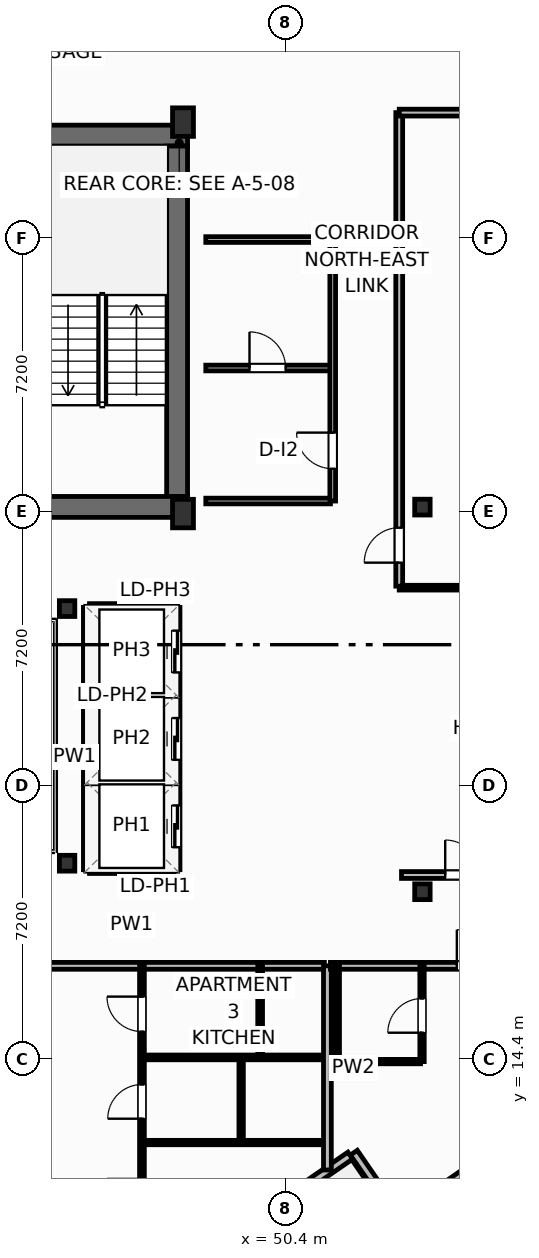
"""IFC4 building model, lengths in metres.
Left out: names, types, materials, properties, quantities, classifications, styles, units other than length and angle.
Written with IfcOpenShell. Run it as: python <this file> out.ifc"""

import sys

from ifc_helpers import new_model, si_unit, direction, frame, frame_2d, origin, origin_2d, place, context, subcontext, project, spatial, rectangle, i_section, extrude, element, fill, save


model = new_model("IFC4")
c1 = context("Model", 3, precision=1e-05, world=origin(), true_north=direction((0.0, 1.0)))
c2 = subcontext(c1, "Body", "Model", "MODEL_VIEW")
j1 = project(units=[si_unit("LENGTHUNIT", "METRE"), si_unit("PLANEANGLEUNIT", "RADIAN")], contexts=[c1])
p1 = place(None, origin())
s1 = spatial("IfcSite", under=j1, at=p1, CompositionType="ELEMENT")
p2 = place(p1, origin())
s2 = spatial("IfcBuilding", under=s1, at=p2, CompositionType="ELEMENT")
p3 = place(p2, frame((0.0, 0.0, 269.3)))
s3 = spatial("IfcBuildingStorey", under=s2, at=p3, CompositionType="ELEMENT", Elevation=269.3)
for number, where, z_axis, x_axis in (
    (1, (47.7, 28.75, 0.0), (0.0, 0.0, 1.0), (1.0, 0.0, 0.0)),
    (2, (47.7, 39.05, 0.0), (0.0, 0.0, 1.0), (1.0, 0.0, 0.0)),
):
    element("IfcColumn", number, at=place(p3, frame(where, z_axis=z_axis, x_axis=x_axis)), inside=s3, PredefinedType="COLUMN", context=c2, shape_type="SweptSolid", body=[
        extrude(rectangle(XDim=0.55, YDim=0.75, at=origin_2d()), origin(), (0.0, 0.0, 1.0), 3.7),
    ])
for number, where, z_axis, x_axis in (
    (3, (44.65, 19.55, 0.0), (0.0, 0.0, 1.0), (1.0, 0.0, 0.0)),
    (4, (44.65, 26.25, 0.0), (0.0, 0.0, 1.0), (1.0, 0.0, 0.0)),
    (5, (54.0, 18.8, 0.0), (0.0, 0.0, 1.0), (1.0, 0.0, 0.0)),
    (6, (54.0, 28.92, 0.0), (0.0, 0.0, 1.0), (1.0, 0.0, 0.0)),
):
    element("IfcColumn", number, at=place(p3, frame(where, z_axis=z_axis, x_axis=x_axis)), inside=s3, PredefinedType="COLUMN", context=c2, shape_type="SweptSolid", body=[
        extrude(i_section(OverallWidth=0.406, OverallDepth=0.416, WebThickness=0.03, FlangeThickness=0.048, FilletRadius=0.025, at=origin_2d()), origin(), (0.0, 0.0, 1.0), 3.7),
    ])
p4 = place(p3, frame((30.58, 38.695, 0.0), z_axis=(0.0, 0.0, 1.0), x_axis=(1.0, 0.0, 0.0)))
e7 = element("IfcWall", 7, at=p4, inside=s3, PredefinedType="SHEAR", context=c2, shape_type="SweptSolid", body=[
    extrude(rectangle(XDim=17.24, YDim=0.55, at=frame_2d((8.62, 0.0))), origin(), (0.0, 0.0, 1.0), 3.45),
])
p5 = place(p3, frame((47.545, 29.2, 0.0), z_axis=(0.0, 0.0, 1.0), x_axis=(0.0, 1.0, 0.0)))
e8 = element("IfcWall", 8, at=p5, inside=s3, PredefinedType="SHEAR", context=c2, shape_type="SweptSolid", body=[
    extrude(rectangle(XDim=9.22, YDim=0.55, at=frame_2d((4.61, 0.0))), origin(), (0.0, 0.0, 1.0), 3.45),
])
p6 = place(p3, frame((43.6, 28.925, 0.0), z_axis=(0.0, 0.0, 1.0), x_axis=(1.0, 0.0, 0.0)))
e9 = element("IfcWall", 9, at=p6, inside=s3, PredefinedType="SHEAR", context=c2, shape_type="SweptSolid", body=[
    extrude(rectangle(XDim=4.22, YDim=0.55, at=frame_2d((2.11, 0.0))), origin(), (0.0, 0.0, 1.0), 3.45),
])
p7 = place(p3, frame((52.103, 11.857, 0.0), z_axis=(0.0, 0.0, 1.0), x_axis=(-0.823534636215, -0.567265989598, 0.0)))
e10 = element("IfcWall", 10, at=p7, inside=s3, PredefinedType="SOLIDWALL", context=c2, shape_type="SweptSolid", body=[
    extrude(rectangle(XDim=6.0, YDim=0.22, at=frame_2d((3.0, 0.0))), origin(), (0.0, 0.0, 1.0), 2.73),
])
p8 = place(p7, frame((3.5, 0.0, 0.0)))
e11 = element("IfcOpeningElement", 11, at=p8, cuts=e10, PredefinedType="OPENING", context=c2, shape_type="SweptSolid", body=[
    extrude(rectangle(XDim=2.1, YDim=2.3, at=frame_2d((1.05, 1.15))), frame((0.0, 0.12, 0.0), z_axis=(0.0, -1.0, 0.0), x_axis=(1.0, 0.0, 0.0)), (0.0, 0.0, 1.0), 0.24),
])
p9 = place(p3, frame((52.196, 11.933, 0.0), z_axis=(0.0, 0.0, 1.0), x_axis=(0.56729822855, -0.823512428494, 0.0)))
e12 = element("IfcWall", 12, at=p9, inside=s3, PredefinedType="SOLIDWALL", context=c2, shape_type="SweptSolid", body=[
    extrude(rectangle(XDim=2.1, YDim=0.22, at=frame_2d((1.05, 0.0))), origin(), (0.0, 0.0, 1.0), 2.73),
])
p10 = place(p3, frame((53.49, 10.275, 0.0), z_axis=(0.0, 0.0, 1.0), x_axis=(0.823530942962, 0.56727135128, 0.0)))
e13 = element("IfcWall", 13, at=p10, inside=s3, PredefinedType="SOLIDWALL", context=c2, shape_type="SweptSolid", body=[
    extrude(rectangle(XDim=8.035, YDim=0.22, at=frame_2d((4.018, 0.0))), origin(), (0.0, 0.0, 1.0), 2.73),
])
p11 = place(p10, frame((2.968, 0.0, 0.8)))
e14 = element("IfcOpeningElement", 14, at=p11, cuts=e13, PredefinedType="OPENING", context=c2, shape_type="SweptSolid", body=[
    extrude(rectangle(XDim=2.1, YDim=1.75, at=frame_2d((1.05, 0.875))), frame((0.0, 0.12, 0.0), z_axis=(0.0, -1.0, 0.0), x_axis=(1.0, 0.0, 0.0)), (0.0, 0.0, 1.0), 0.24),
])
p12 = place(p3, frame((39.28, 16.85, 0.0), z_axis=(0.0, 0.0, 1.0), x_axis=(1.0, 0.0, 0.0)))
e15 = element("IfcWall", 15, at=p12, inside=s3, PredefinedType="PARTITIONING", context=c2, shape_type="SweptSolid", body=[
    extrude(rectangle(XDim=12.14, YDim=0.18, at=frame_2d((6.07, 0.0))), origin(), (0.0, 0.0, 1.0), 3.45),
])
p13 = place(p12, frame((3.135, 0.0, 0.0)))
e16 = element("IfcOpeningElement", 16, at=p13, cuts=e15, PredefinedType="OPENING", context=c2, shape_type="SweptSolid", body=[
    extrude(rectangle(XDim=1.0, YDim=2.2, at=frame_2d((0.5, 1.1))), frame((0.0, 0.1, 0.0), z_axis=(0.0, -1.0, 0.0), x_axis=(1.0, 0.0, 0.0)), (0.0, 0.0, 1.0), 0.2),
])
p14 = place(p3, frame((46.62, 5.567, 0.0), z_axis=(0.0, 0.0, 1.0), x_axis=(0.0, 1.0, 0.0)))
e17 = element("IfcWall", 17, at=p14, inside=s3, PredefinedType="PARTITIONING", context=c2, shape_type="SweptSolid", body=[
    extrude(rectangle(XDim=11.283, YDim=0.125, at=frame_2d((5.642, 0.0))), origin(), (0.0, 0.0, 1.0), 3.45),
])
p15 = place(p14, frame((4.757, 0.0, 0.0)))
e18 = element("IfcOpeningElement", 18, at=p15, cuts=e17, PredefinedType="OPENING", context=c2, shape_type="SweptSolid", body=[
    extrude(rectangle(XDim=0.92, YDim=2.05, at=frame_2d((0.46, 1.025))), frame((0.0, 0.073, 0.0), z_axis=(0.0, -1.0, 0.0), x_axis=(1.0, 0.0, 0.0)), (0.0, 0.0, 1.0), 0.145),
])
p16 = place(p14, frame((7.26, 0.0, 0.0)))
e19 = element("IfcOpeningElement", 19, at=p16, cuts=e17, PredefinedType="OPENING", context=c2, shape_type="SweptSolid", body=[
    extrude(rectangle(XDim=0.9, YDim=2.05, at=frame_2d((0.45, 1.025))), frame((0.0, 0.073, 0.0), z_axis=(0.0, -1.0, 0.0), x_axis=(1.0, 0.0, 0.0)), (0.0, 0.0, 1.0), 0.145),
])
p17 = place(p14, frame((9.553, 0.0, 0.0)))
e20 = element("IfcOpeningElement", 20, at=p17, cuts=e17, PredefinedType="OPENING", context=c2, shape_type="SweptSolid", body=[
    extrude(rectangle(XDim=0.92, YDim=2.05, at=frame_2d((0.46, 1.025))), frame((0.0, 0.073, 0.0), z_axis=(0.0, -1.0, 0.0), x_axis=(1.0, 0.0, 0.0)), (0.0, 0.0, 1.0), 0.145),
])
p18 = place(p3, frame((46.69, 14.44, 0.0), z_axis=(0.0, 0.0, 1.0), x_axis=(1.0, 0.0, 0.0)))
e21 = element("IfcWall", 21, at=p18, inside=s3, PredefinedType="PARTITIONING", context=c2, shape_type="SweptSolid", body=[
    extrude(rectangle(XDim=4.73, YDim=0.125, at=frame_2d((2.365, 0.0))), origin(), (0.0, 0.0, 1.0), 3.45),
])
p19 = place(p3, frame((46.69, 12.2, 0.0), z_axis=(0.0, 0.0, 1.0), x_axis=(1.0, 0.0, 0.0)))
e22 = element("IfcWall", 22, at=p19, inside=s3, PredefinedType="PARTITIONING", context=c2, shape_type="SweptSolid", body=[
    extrude(rectangle(XDim=4.73, YDim=0.115, at=frame_2d((2.365, 0.0))), origin(), (0.0, 0.0, 1.0), 3.45),
])
p20 = place(p3, frame((49.73, 14.44, 0.0), z_axis=(0.0, 0.0, 1.0), x_axis=(0.0, 1.0, 0.0)))
e23 = element("IfcWall", 23, at=p20, inside=s3, PredefinedType="PARTITIONING", context=c2, shape_type="SweptSolid", body=[
    extrude(rectangle(XDim=2.41, YDim=0.125, at=frame_2d((1.205, 0.0))), origin(), (0.0, 0.0, 1.0), 3.45),
])
p21 = place(p3, frame((49.23, 12.2, 0.0), z_axis=(0.0, 0.0, 1.0), x_axis=(0.0, 1.0, 0.0)))
e24 = element("IfcWall", 24, at=p21, inside=s3, PredefinedType="PARTITIONING", context=c2, shape_type="SweptSolid", body=[
    extrude(rectangle(XDim=2.24, YDim=0.115, at=frame_2d((1.12, 0.0))), origin(), (0.0, 0.0, 1.0), 3.45),
])
p22 = place(p3, frame((51.5, 11.479, 0.0), z_axis=(0.0, 0.0, 1.0), x_axis=(0.0, 1.0, 0.0)))
e25 = element("IfcWall", 25, at=p22, inside=s3, PredefinedType="PARTITIONING", context=c2, shape_type="SweptSolid", body=[
    extrude(rectangle(XDim=5.372, YDim=0.205, at=frame_2d((2.686, 0.0))), origin(), (0.0, 0.0, 1.0), 3.45),
])
p23 = place(p3, frame((51.58, 16.85, 0.0), z_axis=(0.0, 0.0, 1.0), x_axis=(1.0, 0.0, 0.0)))
e26 = element("IfcWall", 26, at=p23, inside=s3, PredefinedType="PARTITIONING", context=c2, shape_type="SweptSolid", body=[
    extrude(rectangle(XDim=7.718, YDim=0.18, at=frame_2d((3.859, 0.0))), origin(), (0.0, 0.0, 1.0), 3.45),
])
p24 = place(p23, frame((3.326, 0.0, 0.0)))
e27 = element("IfcOpeningElement", 27, at=p24, cuts=e26, PredefinedType="OPENING", context=c2, shape_type="SweptSolid", body=[
    extrude(rectangle(XDim=0.95, YDim=2.15, at=frame_2d((0.475, 1.075))), frame((0.0, 0.1, 0.0), z_axis=(0.0, -1.0, 0.0), x_axis=(1.0, 0.0, 0.0)), (0.0, 0.0, 1.0), 0.2),
])
p25 = place(p3, frame((51.8, 14.33, 0.0), z_axis=(0.0, 0.0, 1.0), x_axis=(1.0, 0.0, 0.0)))
e28 = element("IfcWall", 28, at=p25, inside=s3, PredefinedType="PARTITIONING", context=c2, shape_type="SweptSolid", body=[
    extrude(rectangle(XDim=2.15, YDim=0.115, at=frame_2d((1.075, 0.0))), origin(), (0.0, 0.0, 1.0), 3.45),
])
p26 = place(p3, frame((53.99, 14.33, 0.0), z_axis=(0.0, 0.0, 1.0), x_axis=(0.0, 1.0, 0.0)))
e29 = element("IfcWall", 29, at=p26, inside=s3, PredefinedType="PARTITIONING", context=c2, shape_type="SweptSolid", body=[
    extrude(rectangle(XDim=2.52, YDim=0.115, at=frame_2d((1.26, 0.0))), origin(), (0.0, 0.0, 1.0), 3.45),
])
p27 = place(p26, frame((0.76, 0.0, 0.0)))
e30 = element("IfcOpeningElement", 30, at=p27, cuts=e29, PredefinedType="OPENING", context=c2, shape_type="SweptSolid", body=[
    extrude(rectangle(XDim=0.9, YDim=2.05, at=frame_2d((0.45, 1.025))), frame((0.0, 0.067, 0.0), z_axis=(0.0, -1.0, 0.0), x_axis=(1.0, 0.0, 0.0)), (0.0, 0.0, 1.0), 0.135),
])
p28 = place(p3, frame((51.76, 14.33, 0.0), z_axis=(0.0, 0.0, 1.0), x_axis=(0.0, 1.0, 0.0)))
e31 = element("IfcWall", 31, at=p28, inside=s3, PredefinedType="PARTITIONING", context=c2, shape_type="SweptSolid", body=[
    extrude(rectangle(XDim=2.52, YDim=0.115, at=frame_2d((1.26, 0.0))), origin(), (0.0, 0.0, 1.0), 3.45),
])
p29 = place(p3, frame((53.45, 19.24, 0.0), z_axis=(0.0, 0.0, 1.0), x_axis=(1.0, 0.0, 0.0)))
e32 = element("IfcWall", 32, at=p29, inside=s3, PredefinedType="PARTITIONING", context=c2, shape_type="SweptSolid", body=[
    extrude(rectangle(XDim=9.318, YDim=0.18, at=frame_2d((4.659, 0.0))), origin(), (0.0, 0.0, 1.0), 2.739),
])
p30 = place(p29, frame((1.15, 0.0, 0.0)))
e33 = element("IfcOpeningElement", 33, at=p30, cuts=e32, PredefinedType="OPENING", context=c2, shape_type="SweptSolid", body=[
    extrude(rectangle(XDim=0.92, YDim=2.05, at=frame_2d((0.46, 1.025))), frame((0.0, 0.1, 0.0), z_axis=(0.0, -1.0, 0.0), x_axis=(1.0, 0.0, 0.0)), (0.0, 0.0, 1.0), 0.2),
])
p31 = place(p3, frame((53.39, 26.8, 0.0), z_axis=(0.0, 0.0, 1.0), x_axis=(1.0, 0.0, 0.0)))
e34 = element("IfcWall", 34, at=p31, inside=s3, PredefinedType="PARTITIONING", context=c2, shape_type="SweptSolid", body=[
    extrude(rectangle(XDim=22.348, YDim=0.125, at=frame_2d((11.174, 0.0))), origin(), (0.0, 0.0, 1.0), 3.45),
])
p32 = place(p3, frame((53.39, 26.84, 0.0), z_axis=(0.0, 0.0, 1.0), x_axis=(0.0, 1.0, 0.0)))
e35 = element("IfcWall", 35, at=p32, inside=s3, PredefinedType="PARTITIONING", context=c2, shape_type="SweptSolid", body=[
    extrude(rectangle(XDim=12.46, YDim=0.18, at=frame_2d((6.23, 0.0))), origin(), (0.0, 0.0, 1.0), 3.45),
])
p33 = place(p32, frame((0.618, 0.0, 0.0)))
e36 = element("IfcOpeningElement", 36, at=p33, cuts=e35, PredefinedType="OPENING", context=c2, shape_type="SweptSolid", body=[
    extrude(rectangle(XDim=0.92, YDim=2.05, at=frame_2d((0.46, 1.025))), frame((0.0, 0.1, 0.0), z_axis=(0.0, -1.0, 0.0), x_axis=(1.0, 0.0, 0.0)), (0.0, 0.0, 1.0), 0.2),
])
p34 = place(p3, frame((53.39, 39.3, 0.0), z_axis=(0.0, 0.0, 1.0), x_axis=(1.0, 0.0, 0.0)))
e37 = element("IfcWall", 37, at=p34, inside=s3, PredefinedType="PARTITIONING", context=c2, shape_type="SweptSolid", body=[
    extrude(rectangle(XDim=16.149, YDim=0.18, at=frame_2d((8.075, 0.0))), origin(), (0.0, 0.0, 1.0), 2.739),
])
p35 = place(p3, frame((48.3, 32.58, 0.0), z_axis=(0.0, 0.0, 1.0), x_axis=(1.0, 0.0, 0.0)))
e38 = element("IfcWall", 38, at=p35, inside=s3, PredefinedType="PARTITIONING", context=c2, shape_type="SweptSolid", body=[
    extrude(rectangle(XDim=3.28, YDim=0.15, at=frame_2d((1.64, 0.0))), origin(), (0.0, 0.0, 1.0), 3.45),
])
p36 = place(p35, frame((1.15, 0.0, 0.0)))
e39 = element("IfcOpeningElement", 39, at=p36, cuts=e38, PredefinedType="OPENING", context=c2, shape_type="SweptSolid", body=[
    extrude(rectangle(XDim=0.95, YDim=2.05, at=frame_2d((0.475, 1.025))), frame((0.0, 0.085, 0.0), z_axis=(0.0, -1.0, 0.0), x_axis=(1.0, 0.0, 0.0)), (0.0, 0.0, 1.0), 0.17),
])
p37 = place(p3, frame((48.3, 29.08, 0.0), z_axis=(0.0, 0.0, 1.0), x_axis=(1.0, 0.0, 0.0)))
e40 = element("IfcWall", 40, at=p37, inside=s3, PredefinedType="PARTITIONING", context=c2, shape_type="SweptSolid", body=[
    extrude(rectangle(XDim=3.28, YDim=0.15, at=frame_2d((1.64, 0.0))), origin(), (0.0, 0.0, 1.0), 2.662),
])
p38 = place(p3, frame((48.3, 35.96, 0.0), z_axis=(0.0, 0.0, 1.0), x_axis=(1.0, 0.0, 0.0)))
e41 = element("IfcWall", 41, at=p38, inside=s3, PredefinedType="PARTITIONING", context=c2, shape_type="SweptSolid", body=[
    extrude(rectangle(XDim=3.28, YDim=0.15, at=frame_2d((1.64, 0.0))), origin(), (0.0, 0.0, 1.0), 3.45),
])
p39 = place(p3, frame((51.64, 29.08, 0.0), z_axis=(0.0, 0.0, 1.0), x_axis=(0.0, 1.0, 0.0)))
e42 = element("IfcWall", 42, at=p39, inside=s3, PredefinedType="PARTITIONING", context=c2, shape_type="SweptSolid", body=[
    extrude(rectangle(XDim=6.88, YDim=0.15, at=frame_2d((3.44, 0.0))), origin(), (0.0, 0.0, 1.0), 3.45),
])
p40 = place(p39, frame((0.85, 0.0, 0.0)))
e43 = element("IfcOpeningElement", 43, at=p40, cuts=e42, PredefinedType="OPENING", context=c2, shape_type="SweptSolid", body=[
    extrude(rectangle(XDim=0.95, YDim=2.05, at=frame_2d((0.475, 1.025))), frame((0.0, 0.085, 0.0), z_axis=(0.0, -1.0, 0.0), x_axis=(1.0, 0.0, 0.0)), (0.0, 0.0, 1.0), 0.17),
])
for number, where, z_axis, x_axis in (
    (44, (45.24, 21.675, 0.0), (0.0, 0.0, 1.0), (1.0, 0.0, 0.0)),
    (45, (45.24, 23.975, 0.0), (0.0, 0.0, 1.0), (1.0, 0.0, 0.0)),
):
    element("IfcWall", number, at=place(p3, frame(where, z_axis=z_axis, x_axis=x_axis)), inside=s3, PredefinedType="PARTITIONING", context=c2, shape_type="SweptSolid", body=[
        extrude(rectangle(XDim=2.22, YDim=0.2, at=frame_2d((1.11, 0.0))), origin(), (0.0, 0.0, 1.0), 3.45),
    ])
p41 = place(p3, frame((45.24, 19.38, 0.0), z_axis=(0.0, 0.0, 1.0), x_axis=(1.0, 0.0, 0.0)))
e46 = element("IfcWall", 46, at=p41, inside=s3, PredefinedType="PARTITIONING", context=c2, shape_type="SweptSolid", body=[
    extrude(rectangle(XDim=2.22, YDim=0.2, at=frame_2d((1.11, 0.0))), origin(), (0.0, 0.0, 1.0), 2.662),
])
p42 = place(p3, frame((45.24, 26.28, 0.0), z_axis=(0.0, 0.0, 1.0), x_axis=(1.0, 0.0, 0.0)))
e47 = element("IfcWall", 47, at=p42, inside=s3, PredefinedType="PARTITIONING", context=c2, shape_type="SweptSolid", body=[
    extrude(rectangle(XDim=2.22, YDim=0.2, at=frame_2d((1.11, 0.0))), origin(), (0.0, 0.0, 1.0), 3.45),
])
p43 = place(p3, frame((45.18, 19.38, 0.0), z_axis=(0.0, 0.0, 1.0), x_axis=(0.0, 1.0, 0.0)))
e48 = element("IfcWall", 48, at=p43, inside=s3, PredefinedType="PARTITIONING", context=c2, shape_type="SweptSolid", body=[
    extrude(rectangle(XDim=6.9, YDim=0.2, at=frame_2d((3.45, 0.0))), origin(), (0.0, 0.0, 1.0), 3.45),
])
p44 = place(p3, frame((47.52, 19.38, 0.0), z_axis=(0.0, 0.0, 1.0), x_axis=(0.0, 1.0, 0.0)))
e49 = element("IfcWall", 49, at=p44, inside=s3, PredefinedType="PARTITIONING", context=c2, shape_type="SweptSolid", body=[
    extrude(rectangle(XDim=6.9, YDim=0.2, at=frame_2d((3.45, 0.0))), origin(), (0.0, 0.0, 1.0), 3.45),
])
p45 = place(p44, frame((0.59, 0.0, 0.0)))
e50 = element("IfcOpeningElement", 50, at=p45, cuts=e49, PredefinedType="OPENING", context=c2, shape_type="SweptSolid", body=[
    extrude(rectangle(XDim=1.1, YDim=2.15, at=frame_2d((0.55, 1.075))), frame((0.0, 0.11, 0.0), z_axis=(0.0, -1.0, 0.0), x_axis=(1.0, 0.0, 0.0)), (0.0, 0.0, 1.0), 0.22),
])
p46 = place(p44, frame((2.89, 0.0, 0.0)))
e51 = element("IfcOpeningElement", 51, at=p46, cuts=e49, PredefinedType="OPENING", context=c2, shape_type="SweptSolid", body=[
    extrude(rectangle(XDim=1.1, YDim=2.15, at=frame_2d((0.55, 1.075))), frame((0.0, 0.11, 0.0), z_axis=(0.0, -1.0, 0.0), x_axis=(1.0, 0.0, 0.0)), (0.0, 0.0, 1.0), 0.22),
])
p47 = place(p44, frame((5.19, 0.0, 0.0)))
e52 = element("IfcOpeningElement", 52, at=p47, cuts=e49, PredefinedType="OPENING", context=c2, shape_type="SweptSolid", body=[
    extrude(rectangle(XDim=1.1, YDim=2.15, at=frame_2d((0.55, 1.075))), frame((0.0, 0.11, 0.0), z_axis=(0.0, -1.0, 0.0), x_axis=(1.0, 0.0, 0.0)), (0.0, 0.0, 1.0), 0.22),
])
p48 = place(p16, origin())
e53 = element("IfcDoor", 53, at=p48, inside=s3, OperationType="SINGLE_SWING_LEFT", PredefinedType="DOOR", context=c2, shape_type="SweptSolid", body=[
    extrude(rectangle(XDim=0.9, YDim=2.05, at=frame_2d((0.45, 1.025))), frame((0.0, 0.025, 0.0), z_axis=(0.0, -1.0, 0.0), x_axis=(1.0, 0.0, 0.0)), (0.0, 0.0, 1.0), 0.05),
])
fill(e19, e53)
p49 = place(p17, origin())
e54 = element("IfcDoor", 54, at=p49, inside=s3, OperationType="SINGLE_SWING_RIGHT", PredefinedType="DOOR", context=c2, shape_type="SweptSolid", body=[
    extrude(rectangle(XDim=0.92, YDim=2.05, at=frame_2d((0.46, 1.025))), frame((0.0, 0.025, 0.0), z_axis=(0.0, -1.0, 0.0), x_axis=(1.0, 0.0, 0.0)), (0.0, 0.0, 1.0), 0.05),
])
fill(e20, e54)
p50 = place(p24, origin())
e55 = element("IfcDoor", 55, at=p50, inside=s3, OperationType="SINGLE_SWING_LEFT", PredefinedType="DOOR", context=c2, shape_type="SweptSolid", body=[
    extrude(rectangle(XDim=0.95, YDim=2.15, at=frame_2d((0.475, 1.075))), frame((0.0, 0.025, 0.0), z_axis=(0.0, -1.0, 0.0), x_axis=(1.0, 0.0, 0.0)), (0.0, 0.0, 1.0), 0.05),
])
fill(e27, e55)
p51 = place(p27, origin())
e56 = element("IfcDoor", 56, at=p51, inside=s3, OperationType="SINGLE_SWING_LEFT", PredefinedType="DOOR", context=c2, shape_type="SweptSolid", body=[
    extrude(rectangle(XDim=0.9, YDim=2.05, at=frame_2d((0.45, 1.025))), frame((0.0, 0.025, 0.0), z_axis=(0.0, -1.0, 0.0), x_axis=(1.0, 0.0, 0.0)), (0.0, 0.0, 1.0), 0.05),
])
fill(e30, e56)
p52 = place(p30, origin())
e57 = element("IfcDoor", 57, at=p52, inside=s3, OperationType="SINGLE_SWING_LEFT", PredefinedType="DOOR", context=c2, shape_type="SweptSolid", body=[
    extrude(rectangle(XDim=0.92, YDim=2.05, at=frame_2d((0.46, 1.025))), frame((0.0, 0.025, 0.0), z_axis=(0.0, -1.0, 0.0), x_axis=(1.0, 0.0, 0.0)), (0.0, 0.0, 1.0), 0.05),
])
fill(e33, e57)
p53 = place(p33, origin())
e58 = element("IfcDoor", 58, at=p53, inside=s3, OperationType="SINGLE_SWING_LEFT", PredefinedType="DOOR", context=c2, shape_type="SweptSolid", body=[
    extrude(rectangle(XDim=0.92, YDim=2.05, at=frame_2d((0.46, 1.025))), frame((0.0, 0.025, 0.0), z_axis=(0.0, -1.0, 0.0), x_axis=(1.0, 0.0, 0.0)), (0.0, 0.0, 1.0), 0.05),
])
fill(e36, e58)
p54 = place(p36, origin())
e59 = element("IfcDoor", 59, at=p54, inside=s3, OperationType="SINGLE_SWING_LEFT", PredefinedType="DOOR", context=c2, shape_type="SweptSolid", body=[
    extrude(rectangle(XDim=0.95, YDim=2.05, at=frame_2d((0.475, 1.025))), frame((0.0, 0.025, 0.0), z_axis=(0.0, -1.0, 0.0), x_axis=(1.0, 0.0, 0.0)), (0.0, 0.0, 1.0), 0.05),
])
fill(e39, e59)
p55 = place(p40, origin())
e60 = element("IfcDoor", 60, at=p55, inside=s3, OperationType="SINGLE_SWING_RIGHT", PredefinedType="DOOR", context=c2, shape_type="SweptSolid", body=[
    extrude(rectangle(XDim=0.95, YDim=2.05, at=frame_2d((0.475, 1.025))), frame((0.0, 0.025, 0.0), z_axis=(0.0, -1.0, 0.0), x_axis=(1.0, 0.0, 0.0)), (0.0, 0.0, 1.0), 0.05),
])
fill(e43, e60)
p56 = place(p45, origin())
e61 = element("IfcDoor", 61, at=p56, inside=s3, OperationType="SLIDING_TO_LEFT", PredefinedType="DOOR", context=c2, shape_type="SweptSolid", body=[
    extrude(rectangle(XDim=1.1, YDim=2.15, at=frame_2d((0.55, 1.075))), frame((0.0, 0.025, 0.0), z_axis=(0.0, -1.0, 0.0), x_axis=(1.0, 0.0, 0.0)), (0.0, 0.0, 1.0), 0.05),
])
fill(e50, e61)
p57 = place(p46, origin())
e62 = element("IfcDoor", 62, at=p57, inside=s3, OperationType="SLIDING_TO_LEFT", PredefinedType="DOOR", context=c2, shape_type="SweptSolid", body=[
    extrude(rectangle(XDim=1.1, YDim=2.15, at=frame_2d((0.55, 1.075))), frame((0.0, 0.025, 0.0), z_axis=(0.0, -1.0, 0.0), x_axis=(1.0, 0.0, 0.0)), (0.0, 0.0, 1.0), 0.05),
])
fill(e51, e62)
p58 = place(p47, origin())
e63 = element("IfcDoor", 63, at=p58, inside=s3, OperationType="SLIDING_TO_LEFT", PredefinedType="DOOR", context=c2, shape_type="SweptSolid", body=[
    extrude(rectangle(XDim=1.1, YDim=2.15, at=frame_2d((0.55, 1.075))), frame((0.0, 0.025, 0.0), z_axis=(0.0, -1.0, 0.0), x_axis=(1.0, 0.0, 0.0)), (0.0, 0.0, 1.0), 0.05),
])
fill(e52, e63)
save(model, sys.argv[1])
